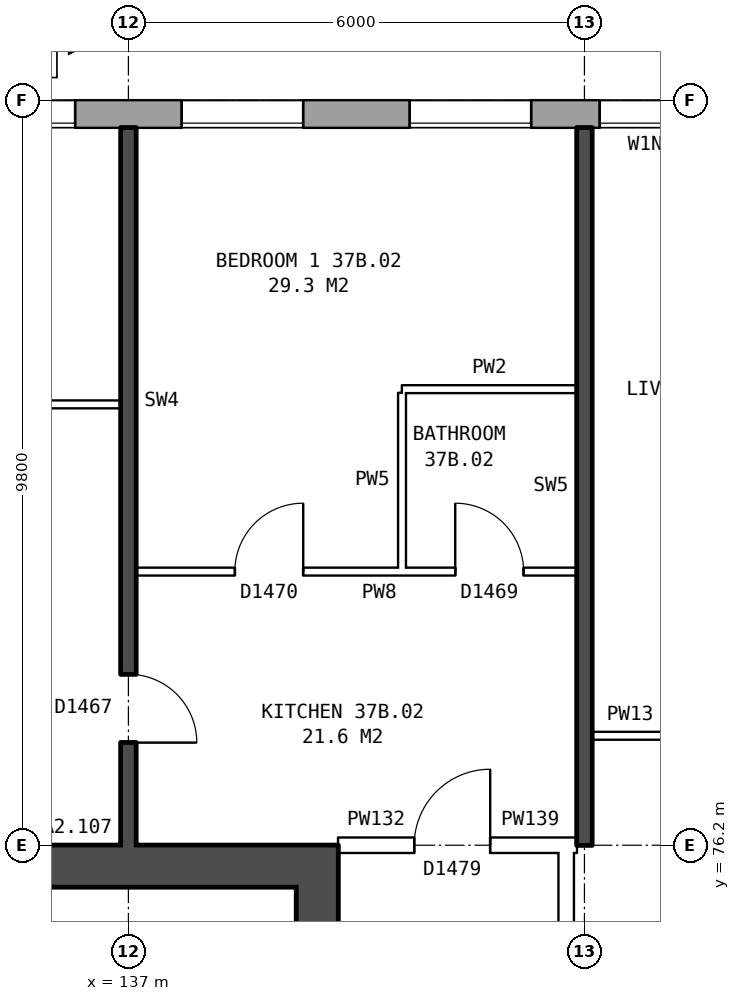
"""IFC4 building model, lengths in metres.
Left out: names, types, materials, properties, quantities, classifications, styles, units other than length and angle.
Written with IfcOpenShell. Run it as: python <this file> out.ifc"""

import sys

from ifc_helpers import new_model, si_unit, direction, frame, frame_2d, origin, place, context, subcontext, project, spatial, rectangle, extrude, element, fill, save


model = new_model("IFC4")
c1 = context("Model", 3, precision=1e-05, world=origin(), true_north=direction((0.0, 1.0)))
c2 = subcontext(c1, "Body", "Model", "MODEL_VIEW")
j1 = project(units=[si_unit("LENGTHUNIT", "METRE"), si_unit("PLANEANGLEUNIT", "RADIAN")], contexts=[c1])
p1 = place(None, origin())
s1 = spatial("IfcSite", under=j1, at=p1, CompositionType="ELEMENT")
p2 = place(p1, origin())
s2 = spatial("IfcBuilding", under=s1, at=p2, CompositionType="ELEMENT")
p3 = place(p2, frame((0.0, 0.0, 133.0)))
s3 = spatial("IfcBuildingStorey", under=s2, at=p3, CompositionType="ELEMENT", Elevation=133.0)
p4 = place(p3, frame((169.675, 85.82, 0.0), z_axis=(0.0, 0.0, 1.0), x_axis=(-1.0, 0.0, 0.0)))
e1 = element("IfcWall", 1, at=p4, inside=s3, PredefinedType="STANDARD", context=c2, shape_type="SweptSolid", body=[
    extrude(rectangle(XDim=35.601, YDim=0.36, at=frame_2d((17.8, 0.0))), origin(), (0.0, 0.0, 1.0), 2.85),
])
p5 = place(p4, frame((0.375, 0.0, 0.8)))
e2 = element("IfcOpeningElement", 2, at=p5, cuts=e1, PredefinedType="OPENING", context=c2, shape_type="SweptSolid", body=[
    extrude(rectangle(XDim=1.6, YDim=1.8, at=frame_2d((0.8, 0.9))), frame((0.0, 0.19, 0.0), z_axis=(0.0, -1.0, 0.0), x_axis=(1.0, 0.0, 0.0)), (0.0, 0.0, 1.0), 0.38),
])
p6 = place(p4, frame((3.375, 0.0, 0.8)))
e3 = element("IfcOpeningElement", 3, at=p6, cuts=e1, PredefinedType="OPENING", context=c2, shape_type="SweptSolid", body=[
    extrude(rectangle(XDim=1.6, YDim=1.8, at=frame_2d((0.8, 0.9))), frame((0.0, 0.19, 0.0), z_axis=(0.0, -1.0, 0.0), x_axis=(1.0, 0.0, 0.0)), (0.0, 0.0, 1.0), 0.38),
])
p7 = place(p4, frame((6.375, 0.0, 0.8)))
e4 = element("IfcOpeningElement", 4, at=p7, cuts=e1, PredefinedType="OPENING", context=c2, shape_type="SweptSolid", body=[
    extrude(rectangle(XDim=1.6, YDim=1.8, at=frame_2d((0.8, 0.9))), frame((0.0, 0.19, 0.0), z_axis=(0.0, -1.0, 0.0), x_axis=(1.0, 0.0, 0.0)), (0.0, 0.0, 1.0), 0.38),
])
p8 = place(p4, frame((8.875, 0.0, 0.8)))
e5 = element("IfcOpeningElement", 5, at=p8, cuts=e1, PredefinedType="OPENING", context=c2, shape_type="SweptSolid", body=[
    extrude(rectangle(XDim=0.8, YDim=1.8, at=frame_2d((0.4, 0.9))), frame((0.0, 0.19, 0.0), z_axis=(0.0, -1.0, 0.0), x_axis=(1.0, 0.0, 0.0)), (0.0, 0.0, 1.0), 0.38),
])
p9 = place(p4, frame((12.375, 0.0, 0.8)))
e6 = element("IfcOpeningElement", 6, at=p9, cuts=e1, PredefinedType="OPENING", context=c2, shape_type="SweptSolid", body=[
    extrude(rectangle(XDim=1.6, YDim=1.8, at=frame_2d((0.8, 0.9))), frame((0.0, 0.19, 0.0), z_axis=(0.0, -1.0, 0.0), x_axis=(1.0, 0.0, 0.0)), (0.0, 0.0, 1.0), 0.38),
])
p10 = place(p4, frame((15.375, 0.0, 0.8)))
e7 = element("IfcOpeningElement", 7, at=p10, cuts=e1, PredefinedType="OPENING", context=c2, shape_type="SweptSolid", body=[
    extrude(rectangle(XDim=1.6, YDim=1.8, at=frame_2d((0.8, 0.9))), frame((0.0, 0.19, 0.0), z_axis=(0.0, -1.0, 0.0), x_axis=(1.0, 0.0, 0.0)), (0.0, 0.0, 1.0), 0.38),
])
p11 = place(p4, frame((18.375, 0.0, 0.8)))
e8 = element("IfcOpeningElement", 8, at=p11, cuts=e1, PredefinedType="OPENING", context=c2, shape_type="SweptSolid", body=[
    extrude(rectangle(XDim=1.6, YDim=1.8, at=frame_2d((0.8, 0.9))), frame((0.0, 0.19, 0.0), z_axis=(0.0, -1.0, 0.0), x_axis=(1.0, 0.0, 0.0)), (0.0, 0.0, 1.0), 0.38),
])
p12 = place(p4, frame((21.375, 0.0, 0.8)))
e9 = element("IfcOpeningElement", 9, at=p12, cuts=e1, PredefinedType="OPENING", context=c2, shape_type="SweptSolid", body=[
    extrude(rectangle(XDim=1.6, YDim=1.8, at=frame_2d((0.8, 0.9))), frame((0.0, 0.19, 0.0), z_axis=(0.0, -1.0, 0.0), x_axis=(1.0, 0.0, 0.0)), (0.0, 0.0, 1.0), 0.38),
])
p13 = place(p4, frame((23.825, 0.0, 0.15)))
e10 = element("IfcOpeningElement", 10, at=p13, cuts=e1, PredefinedType="OPENING", context=c2, shape_type="SweptSolid", body=[
    extrude(rectangle(XDim=0.6, YDim=0.9, at=frame_2d((0.3, 0.45))), frame((0.0, 0.19, 0.0), z_axis=(0.0, -1.0, 0.0), x_axis=(1.0, 0.0, 0.0)), (0.0, 0.0, 1.0), 0.38),
])
p14 = place(p4, frame((27.375, 0.0, 0.8)))
e11 = element("IfcOpeningElement", 11, at=p14, cuts=e1, PredefinedType="OPENING", context=c2, shape_type="SweptSolid", body=[
    extrude(rectangle(XDim=1.6, YDim=1.8, at=frame_2d((0.8, 0.9))), frame((0.0, 0.19, 0.0), z_axis=(0.0, -1.0, 0.0), x_axis=(1.0, 0.0, 0.0)), (0.0, 0.0, 1.0), 0.38),
])
p15 = place(p4, frame((30.375, 0.0, 0.8)))
e12 = element("IfcOpeningElement", 12, at=p15, cuts=e1, PredefinedType="OPENING", context=c2, shape_type="SweptSolid", body=[
    extrude(rectangle(XDim=1.6, YDim=1.8, at=frame_2d((0.8, 0.9))), frame((0.0, 0.19, 0.0), z_axis=(0.0, -1.0, 0.0), x_axis=(1.0, 0.0, 0.0)), (0.0, 0.0, 1.0), 0.38),
])
p16 = place(p4, frame((33.375, 0.0, 0.8)))
e13 = element("IfcOpeningElement", 13, at=p16, cuts=e1, PredefinedType="OPENING", context=c2, shape_type="SweptSolid", body=[
    extrude(rectangle(XDim=1.6, YDim=1.8, at=frame_2d((0.8, 0.9))), frame((0.0, 0.19, 0.0), z_axis=(0.0, -1.0, 0.0), x_axis=(1.0, 0.0, 0.0)), (0.0, 0.0, 1.0), 0.38),
])
p17 = place(p4, frame((9.975, 0.0, 1.7)))
e14 = element("IfcOpeningElement", 14, at=p17, cuts=e1, PredefinedType="OPENING", context=c2, shape_type="SweptSolid", body=[
    extrude(rectangle(XDim=0.6, YDim=0.9, at=frame_2d((0.3, 0.45))), frame((0.0, 0.19, 0.0), z_axis=(0.0, -1.0, 0.0), x_axis=(1.0, 0.0, 0.0)), (0.0, 0.0, 1.0), 0.38),
])
p18 = place(p4, frame((25.275, 0.0, 1.35)))
e15 = element("IfcOpeningElement", 15, at=p18, cuts=e1, PredefinedType="OPENING", context=c2, shape_type="SweptSolid", body=[
    extrude(rectangle(XDim=1.2, YDim=1.2, at=frame_2d((0.6, 0.6))), frame((0.0, 0.19, 0.0), z_axis=(0.0, -1.0, 0.0), x_axis=(1.0, 0.0, 0.0)), (0.0, 0.0, 1.0), 0.38),
])
p19 = place(p3, frame((139.485, 63.8, 0.0), z_axis=(0.0, 0.0, 1.0), x_axis=(0.0, 1.0, 0.0)))
e16 = element("IfcWall", 16, at=p19, inside=s3, PredefinedType="SHEAR", context=c2, shape_type="SweptSolid", body=[
    extrude(rectangle(XDim=12.4, YDim=0.55, at=frame_2d((6.2, 0.0))), origin(), (0.0, 0.0, 1.0), 2.85),
])
p20 = place(p19, frame((1.325, 0.0, 0.0)))
e17 = element("IfcOpeningElement", 17, at=p20, cuts=e16, PredefinedType="OPENING", context=c2, shape_type="SweptSolid", body=[
    extrude(rectangle(XDim=1.1, YDim=2.1, at=frame_2d((0.55, 1.05))), frame((0.0, 0.285, 0.0), z_axis=(0.0, -1.0, 0.0), x_axis=(1.0, 0.0, 0.0)), (0.0, 0.0, 1.0), 0.57),
])
p21 = place(p19, frame((3.6, 0.0, 0.0)))
e18 = element("IfcOpeningElement", 18, at=p21, cuts=e16, PredefinedType="OPENING", context=c2, shape_type="SweptSolid", body=[
    extrude(rectangle(XDim=1.1, YDim=2.1, at=frame_2d((0.55, 1.05))), frame((0.0, 0.285, 0.0), z_axis=(0.0, -1.0, 0.0), x_axis=(1.0, 0.0, 0.0)), (0.0, 0.0, 1.0), 0.57),
])
p22 = place(p19, frame((5.8, 0.0, 0.0)))
e19 = element("IfcOpeningElement", 19, at=p22, cuts=e16, PredefinedType="OPENING", context=c2, shape_type="SweptSolid", body=[
    extrude(rectangle(XDim=1.1, YDim=2.1, at=frame_2d((0.55, 1.05))), frame((0.0, 0.285, 0.0), z_axis=(0.0, -1.0, 0.0), x_axis=(1.0, 0.0, 0.0)), (0.0, 0.0, 1.0), 0.57),
])
p23 = place(p19, frame((9.9, 0.0, 0.0)))
e20 = element("IfcOpeningElement", 20, at=p23, cuts=e16, PredefinedType="OPENING", context=c2, shape_type="SweptSolid", body=[
    extrude(rectangle(XDim=1.1, YDim=2.1, at=frame_2d((0.55, 1.05))), frame((0.0, 0.285, 0.0), z_axis=(0.0, -1.0, 0.0), x_axis=(1.0, 0.0, 0.0)), (0.0, 0.0, 1.0), 0.57),
])
p24 = place(p19, frame((8.125, 0.0, 0.0)))
e21 = element("IfcOpeningElement", 21, at=p24, cuts=e16, PredefinedType="OPENING", context=c2, shape_type="SweptSolid", body=[
    extrude(rectangle(XDim=0.85, YDim=2.1, at=frame_2d((0.425, 1.05))), frame((0.0, 0.285, 0.0), z_axis=(0.0, -1.0, 0.0), x_axis=(1.0, 0.0, 0.0)), (0.0, 0.0, 1.0), 0.57),
])
p25 = place(p3, frame((139.21, 75.925, 0.0), z_axis=(0.0, 0.0, 1.0), x_axis=(-1.0, 0.0, 0.0)))
e22 = element("IfcWall", 22, at=p25, inside=s3, PredefinedType="SHEAR", context=c2, shape_type="SweptSolid", body=[
    extrude(rectangle(XDim=7.3, YDim=0.55, at=frame_2d((3.65, 0.0))), origin(), (0.0, 0.0, 1.0), 2.85),
])
p26 = place(p3, frame((142.76, 63.9, 0.0), z_axis=(0.0, 0.0, 1.0), x_axis=(0.0, 1.0, 0.0)))
e23 = element("IfcWall", 23, at=p26, inside=s3, PredefinedType="PARTITIONING", context=c2, shape_type="SweptSolid", body=[
    extrude(rectangle(XDim=12.2, YDim=0.2, at=frame_2d((6.1, 0.0))), origin(), (0.0, 0.0, 1.0), 2.85),
])
p27 = place(p26, frame((5.1, 0.0, 0.0)))
e24 = element("IfcOpeningElement", 24, at=p27, cuts=e23, PredefinedType="OPENING", context=c2, shape_type="SweptSolid", body=[
    extrude(rectangle(XDim=2.0, YDim=2.1, at=frame_2d((1.0, 1.05))), frame((0.0, 0.11, 0.0), z_axis=(0.0, -1.0, 0.0), x_axis=(1.0, 0.0, 0.0)), (0.0, 0.0, 1.0), 0.22),
])
p28 = place(p3, frame((139.76, 76.2, 0.0), z_axis=(0.0, 0.0, 1.0), x_axis=(1.0, 0.0, 0.0)))
e25 = element("IfcWall", 25, at=p28, inside=s3, PredefinedType="PARTITIONING", context=c2, shape_type="SweptSolid", body=[
    extrude(rectangle(XDim=3.0, YDim=0.2, at=frame_2d((1.5, 0.0))), origin(), (0.0, 0.0, 1.0), 2.85),
])
p29 = place(p28, frame((1.0, 0.0, 0.0)))
e26 = element("IfcOpeningElement", 26, at=p29, cuts=e25, PredefinedType="OPENING", context=c2, shape_type="SweptSolid", body=[
    extrude(rectangle(XDim=1.0, YDim=2.1, at=frame_2d((0.5, 1.05))), frame((0.0, 0.11, 0.0), z_axis=(0.0, -1.0, 0.0), x_axis=(1.0, 0.0, 0.0)), (0.0, 0.0, 1.0), 0.22),
])
p30 = place(p3, frame((142.76, 76.2, 0.0), z_axis=(0.0, 0.0, 1.0), x_axis=(1.0, 0.0, 0.0)))
e27 = element("IfcWall", 27, at=p30, inside=s3, PredefinedType="PARTITIONING", context=c2, shape_type="SweptSolid", body=[
    extrude(rectangle(XDim=0.14, YDim=0.2, at=frame_2d((0.07, 0.0))), origin(), (0.0, 0.0, 1.0), 2.85),
])
p31 = place(p3, frame((143.1, 77.64, 0.0), z_axis=(0.0, 0.0, 1.0), x_axis=(1.0, 0.0, 0.0)))
e28 = element("IfcWall", 28, at=p31, inside=s3, PredefinedType="PARTITIONING", context=c2, shape_type="SweptSolid", body=[
    extrude(rectangle(XDim=2.9, YDim=0.1, at=frame_2d((1.45, 0.0))), origin(), (0.0, 0.0, 1.0), 2.85),
])
p32 = place(p31, frame((1.0, 0.0, 0.0)))
e29 = element("IfcOpeningElement", 29, at=p32, cuts=e28, PredefinedType="OPENING", context=c2, shape_type="SweptSolid", body=[
    extrude(rectangle(XDim=0.9, YDim=2.1, at=frame_2d((0.45, 1.05))), frame((0.0, 0.06, 0.0), z_axis=(0.0, -1.0, 0.0), x_axis=(1.0, 0.0, 0.0)), (0.0, 0.0, 1.0), 0.12),
])
p33 = place(p3, frame((137.1, 79.8, 0.0), z_axis=(0.0, 0.0, 1.0), x_axis=(1.0, 0.0, 0.0)))
e30 = element("IfcWall", 30, at=p33, inside=s3, PredefinedType="PARTITIONING", context=c2, shape_type="SweptSolid", body=[
    extrude(rectangle(XDim=5.8, YDim=0.1, at=frame_2d((2.9, 0.0))), origin(), (0.0, 0.0, 1.0), 2.85),
])
p34 = place(p33, frame((1.3, 0.0, 0.0)))
e31 = element("IfcOpeningElement", 31, at=p34, cuts=e30, PredefinedType="OPENING", context=c2, shape_type="SweptSolid", body=[
    extrude(rectangle(XDim=0.9, YDim=2.1, at=frame_2d((0.45, 1.05))), frame((0.0, 0.06, 0.0), z_axis=(0.0, -1.0, 0.0), x_axis=(1.0, 0.0, 0.0)), (0.0, 0.0, 1.0), 0.12),
])
p35 = place(p33, frame((4.2, 0.0, 0.0)))
e32 = element("IfcOpeningElement", 32, at=p35, cuts=e30, PredefinedType="OPENING", context=c2, shape_type="SweptSolid", body=[
    extrude(rectangle(XDim=0.9, YDim=2.1, at=frame_2d((0.45, 1.05))), frame((0.0, 0.06, 0.0), z_axis=(0.0, -1.0, 0.0), x_axis=(1.0, 0.0, 0.0)), (0.0, 0.0, 1.0), 0.12),
])
p36 = place(p3, frame((131.36, 82.0, 0.0), z_axis=(0.0, 0.0, 1.0), x_axis=(1.0, 0.0, 0.0)))
e33 = element("IfcWall", 33, at=p36, inside=s3, PredefinedType="PARTITIONING", context=c2, shape_type="SweptSolid", body=[
    extrude(rectangle(XDim=5.54, YDim=0.1, at=frame_2d((2.77, 0.0))), origin(), (0.0, 0.0, 1.0), 2.85),
])
p37 = place(p36, frame((2.32, 0.0, 0.0)))
e34 = element("IfcOpeningElement", 34, at=p37, cuts=e33, PredefinedType="OPENING", context=c2, shape_type="SweptSolid", body=[
    extrude(rectangle(XDim=0.9, YDim=2.1, at=frame_2d((0.45, 1.05))), frame((0.0, 0.06, 0.0), z_axis=(0.0, -1.0, 0.0), x_axis=(1.0, 0.0, 0.0)), (0.0, 0.0, 1.0), 0.12),
])
p38 = place(p3, frame((140.6, 82.2, 0.0), z_axis=(0.0, 0.0, 1.0), x_axis=(1.0, 0.0, 0.0)))
e35 = element("IfcWall", 35, at=p38, inside=s3, PredefinedType="PARTITIONING", context=c2, shape_type="SweptSolid", body=[
    extrude(rectangle(XDim=2.3, YDim=0.1, at=frame_2d((1.15, 0.0))), origin(), (0.0, 0.0, 1.0), 2.85),
])
p39 = place(p3, frame((137.0, 76.2, 0.0), z_axis=(0.0, 0.0, 1.0), x_axis=(0.0, 1.0, 0.0)))
e36 = element("IfcWall", 36, at=p39, inside=s3, PredefinedType="SOLIDWALL", context=c2, shape_type="SweptSolid", body=[
    extrude(rectangle(XDim=9.44, YDim=0.2, at=frame_2d((4.72, 0.0))), origin(), (0.0, 0.0, 1.0), 2.85),
])
p40 = place(p39, frame((1.35, 0.0, 0.0)))
e37 = element("IfcOpeningElement", 37, at=p40, cuts=e36, PredefinedType="OPENING", context=c2, shape_type="SweptSolid", body=[
    extrude(rectangle(XDim=0.9, YDim=2.1, at=frame_2d((0.45, 1.05))), frame((0.0, 0.11, 0.0), z_axis=(0.0, -1.0, 0.0), x_axis=(1.0, 0.0, 0.0)), (0.0, 0.0, 1.0), 0.22),
])
p41 = place(p3, frame((140.6, 79.85, 0.0), z_axis=(0.0, 0.0, 1.0), x_axis=(0.0, 1.0, 0.0)))
e38 = element("IfcWall", 38, at=p41, inside=s3, PredefinedType="PARTITIONING", context=c2, shape_type="SweptSolid", body=[
    extrude(rectangle(XDim=2.3, YDim=0.1, at=frame_2d((1.15, 0.0))), origin(), (0.0, 0.0, 1.0), 2.85),
])
p42 = place(p3, frame((143.0, 76.2, 0.0), z_axis=(0.0, 0.0, 1.0), x_axis=(0.0, 1.0, 0.0)))
e39 = element("IfcWall", 39, at=p42, inside=s3, PredefinedType="SOLIDWALL", context=c2, shape_type="SweptSolid", body=[
    extrude(rectangle(XDim=9.44, YDim=0.2, at=frame_2d((4.72, 0.0))), origin(), (0.0, 0.0, 1.0), 2.85),
])
p43 = place(p14, origin())
e40 = element("IfcWindow", 40, at=p43, inside=s3, PartitioningType="SINGLE_PANEL", PredefinedType="WINDOW", context=c2, shape_type="SweptSolid", body=[
    extrude(rectangle(XDim=1.6, YDim=1.8, at=frame_2d((0.8, 0.9))), frame((0.0, 0.15, 0.0), z_axis=(0.0, -1.0, 0.0), x_axis=(1.0, 0.0, 0.0)), (0.0, 0.0, 1.0), 0.06),
])
fill(e11, e40)
p44 = place(p15, origin())
e41 = element("IfcWindow", 41, at=p44, inside=s3, PartitioningType="SINGLE_PANEL", PredefinedType="WINDOW", context=c2, shape_type="SweptSolid", body=[
    extrude(rectangle(XDim=1.6, YDim=1.8, at=frame_2d((0.8, 0.9))), frame((0.0, 0.15, 0.0), z_axis=(0.0, -1.0, 0.0), x_axis=(1.0, 0.0, 0.0)), (0.0, 0.0, 1.0), 0.06),
])
fill(e12, e41)
p45 = place(p16, origin())
e42 = element("IfcWindow", 42, at=p45, inside=s3, PartitioningType="SINGLE_PANEL", PredefinedType="WINDOW", context=c2, shape_type="SweptSolid", body=[
    extrude(rectangle(XDim=1.6, YDim=1.8, at=frame_2d((0.8, 0.9))), frame((0.0, 0.15, 0.0), z_axis=(0.0, -1.0, 0.0), x_axis=(1.0, 0.0, 0.0)), (0.0, 0.0, 1.0), 0.06),
])
fill(e13, e42)
p46 = place(p34, origin())
e43 = element("IfcDoor", 43, at=p46, inside=s3, OperationType="SINGLE_SWING_RIGHT", PredefinedType="DOOR", context=c2, shape_type="SweptSolid", body=[
    extrude(rectangle(XDim=0.9, YDim=2.1, at=frame_2d((0.45, 1.05))), frame((0.0, 0.025, 0.0), z_axis=(0.0, -1.0, 0.0), x_axis=(1.0, 0.0, 0.0)), (0.0, 0.0, 1.0), 0.05),
])
fill(e31, e43)
p47 = place(p29, origin())
e44 = element("IfcDoor", 44, at=p47, inside=s3, OperationType="SINGLE_SWING_RIGHT", PredefinedType="DOOR", context=c2, shape_type="SweptSolid", body=[
    extrude(rectangle(XDim=1.0, YDim=2.1, at=frame_2d((0.5, 1.05))), frame((0.0, 0.025, 0.0), z_axis=(0.0, -1.0, 0.0), x_axis=(1.0, 0.0, 0.0)), (0.0, 0.0, 1.0), 0.05),
])
fill(e26, e44)
p48 = place(p40, frame((0.9, 0.0, 0.0), z_axis=(0.0, 0.0, 1.0), x_axis=(-1.0, 0.0, 0.0)))
e45 = element("IfcDoor", 45, at=p48, inside=s3, OperationType="SINGLE_SWING_RIGHT", PredefinedType="DOOR", context=c2, shape_type="SweptSolid", body=[
    extrude(rectangle(XDim=0.9, YDim=2.1, at=frame_2d((0.45, 1.05))), frame((0.0, 0.025, 0.0), z_axis=(0.0, -1.0, 0.0), x_axis=(1.0, 0.0, 0.0)), (0.0, 0.0, 1.0), 0.05),
])
fill(e37, e45)
p49 = place(p35, origin())
e46 = element("IfcDoor", 46, at=p49, inside=s3, OperationType="SINGLE_SWING_LEFT", PredefinedType="DOOR", context=c2, shape_type="SweptSolid", body=[
    extrude(rectangle(XDim=0.9, YDim=2.1, at=frame_2d((0.45, 1.05))), frame((0.0, 0.025, 0.0), z_axis=(0.0, -1.0, 0.0), x_axis=(1.0, 0.0, 0.0)), (0.0, 0.0, 1.0), 0.05),
])
fill(e32, e46)
p50 = place(p18, origin())
e47 = element("IfcWindow", 47, at=p50, inside=s3, PartitioningType="SINGLE_PANEL", PredefinedType="WINDOW", context=c2, shape_type="SweptSolid", body=[
    extrude(rectangle(XDim=1.2, YDim=1.2, at=frame_2d((0.6, 0.6))), frame((0.0, 0.15, 0.0), z_axis=(0.0, -1.0, 0.0), x_axis=(1.0, 0.0, 0.0)), (0.0, 0.0, 1.0), 0.06),
])
fill(e15, e47)
save(model, sys.argv[1])
